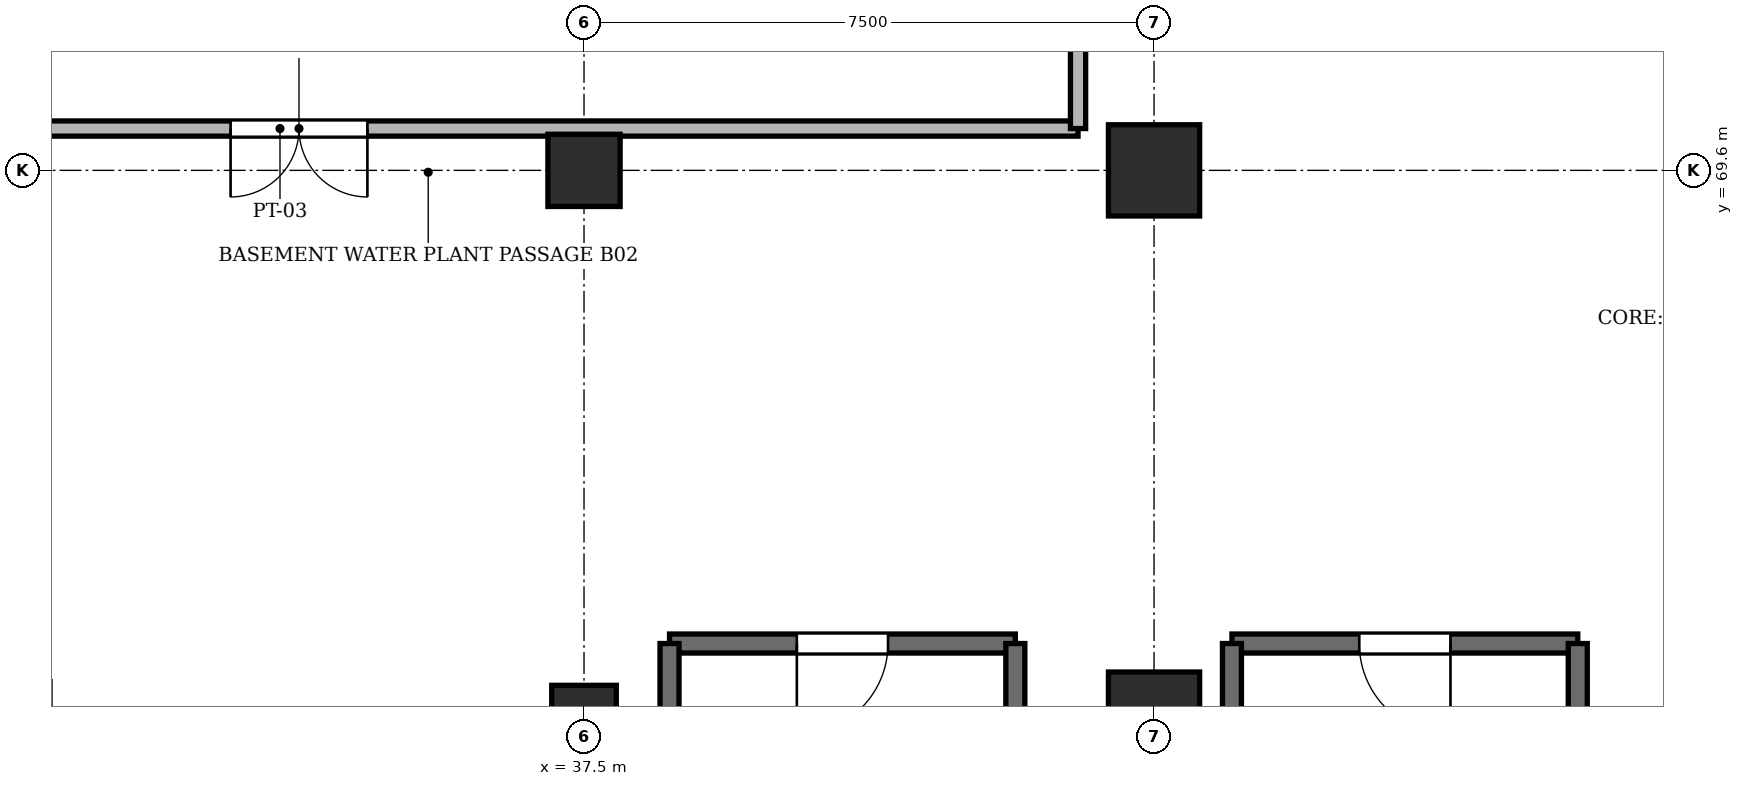
"""IFC4 building model, lengths in metres.
Left out: names, types, materials, properties, quantities, classifications, styles, units other than length and angle.
Written with IfcOpenShell. Run it as: python <this file> out.ifc"""

import sys

from ifc_helpers import new_model, si_unit, direction, frame, frame_2d, origin, origin_2d, place, context, subcontext, project, spatial, rectangle, extrude, element, fill, save


model = new_model("IFC4")
c1 = context("Model", 3, precision=1e-05, world=origin(), true_north=direction((0.0, 1.0)))
c2 = subcontext(c1, "Body", "Model", "MODEL_VIEW")
j1 = project(units=[si_unit("LENGTHUNIT", "METRE"), si_unit("PLANEANGLEUNIT", "RADIAN")], contexts=[c1])
p1 = place(None, origin())
s1 = spatial("IfcSite", under=j1, at=p1, CompositionType="ELEMENT")
p2 = place(p1, origin())
s2 = spatial("IfcBuilding", under=s1, at=p2, CompositionType="ELEMENT")
p3 = place(p2, frame((0.0, 0.0, -9.0)))
s3 = spatial("IfcBuildingStorey", under=s2, at=p3, CompositionType="ELEMENT", Elevation=-9.0)
p4 = place(p3, frame((37.5, 62.4, 0.0), z_axis=(0.0, 0.0, 1.0), x_axis=(1.0, 0.0, 0.0)))
e1 = element("IfcColumn", 1, at=p4, inside=s3, PredefinedType="COLUMN", context=c2, shape_type="SweptSolid", body=[
    extrude(rectangle(XDim=0.85, YDim=0.85, at=origin_2d()), origin(), (0.0, 0.0, 1.0), 4.18),
])
p5 = place(p3, frame((37.5, 69.6, 0.0), z_axis=(0.0, 0.0, 1.0), x_axis=(1.0, 0.0, 0.0)))
e2 = element("IfcColumn", 2, at=p5, inside=s3, PredefinedType="COLUMN", context=c2, shape_type="SweptSolid", body=[
    extrude(rectangle(XDim=0.95, YDim=0.95, at=origin_2d()), origin(), (0.0, 0.0, 1.0), 4.18),
])
for number, where, z_axis, x_axis in (
    (3, (45.0, 62.4, 0.0), (0.0, 0.0, 1.0), (1.0, 0.0, 0.0)),
    (4, (45.0, 69.6, 0.0), (0.0, 0.0, 1.0), (1.0, 0.0, 0.0)),
):
    element("IfcColumn", number, at=place(p3, frame(where, z_axis=z_axis, x_axis=x_axis)), inside=s3, PredefinedType="COLUMN", context=c2, shape_type="SweptSolid", body=[
        extrude(rectangle(XDim=1.2, YDim=1.2, at=origin_2d()), origin(), (0.0, 0.0, 1.0), 4.18),
    ])
p6 = place(p3, frame((50.575, 63.375, 0.0), z_axis=(0.0, 0.0, 1.0), x_axis=(-1.0, 0.0, 0.0)))
e5 = element("IfcWall", 5, at=p6, inside=s3, PredefinedType="SHEAR", context=c2, shape_type="SweptSolid", body=[
    extrude(rectangle(XDim=4.55, YDim=0.25, at=frame_2d((2.275, 0.0))), origin(), (0.0, 0.0, 1.0), 4.18),
])
p7 = place(p6, frame((1.675, 0.0, 0.0)))
e6 = element("IfcOpeningElement", 6, at=p7, cuts=e5, PredefinedType="OPENING", context=c2, shape_type="SweptSolid", body=[
    extrude(rectangle(XDim=1.2, YDim=2.2, at=frame_2d((0.6, 1.1))), frame((0.0, 0.137, 0.0), z_axis=(0.0, -1.0, 0.0), x_axis=(1.0, 0.0, 0.0)), (0.0, 0.0, 1.0), 0.274),
])
for number, where, z_axis, x_axis in (
    (7, (46.025, 63.375, 0.0), (0.0, 0.0, 1.0), (0.0, -1.0, 0.0)),
    (8, (50.575, 56.175, 0.0), (0.0, 0.0, 1.0), (0.0, 1.0, 0.0)),
):
    element("IfcWall", number, at=place(p3, frame(where, z_axis=z_axis, x_axis=x_axis)), inside=s3, PredefinedType="SHEAR", context=c2, shape_type="SweptSolid", body=[
        extrude(rectangle(XDim=7.2, YDim=0.25, at=frame_2d((3.6, 0.0))), origin(), (0.0, 0.0, 1.0), 4.18),
    ])
p8 = place(p3, frame((43.175, 63.375, 0.0), z_axis=(0.0, 0.0, 1.0), x_axis=(-1.0, 0.0, 0.0)))
e9 = element("IfcWall", 9, at=p8, inside=s3, PredefinedType="SHEAR", context=c2, shape_type="SweptSolid", body=[
    extrude(rectangle(XDim=4.55, YDim=0.25, at=frame_2d((2.275, 0.0))), origin(), (0.0, 0.0, 1.0), 4.18),
])
p9 = place(p8, frame((1.675, 0.0, 0.0)))
e10 = element("IfcOpeningElement", 10, at=p9, cuts=e9, PredefinedType="OPENING", context=c2, shape_type="SweptSolid", body=[
    extrude(rectangle(XDim=1.2, YDim=2.2, at=frame_2d((0.6, 1.1))), frame((0.0, 0.137, 0.0), z_axis=(0.0, -1.0, 0.0), x_axis=(1.0, 0.0, 0.0)), (0.0, 0.0, 1.0), 0.274),
])
for number, where, z_axis, x_axis in (
    (11, (38.625, 63.375, 0.0), (0.0, 0.0, 1.0), (0.0, -1.0, 0.0)),
    (12, (43.175, 56.175, 0.0), (0.0, 0.0, 1.0), (0.0, 1.0, 0.0)),
):
    element("IfcWall", number, at=place(p3, frame(where, z_axis=z_axis, x_axis=x_axis)), inside=s3, PredefinedType="SHEAR", context=c2, shape_type="SweptSolid", body=[
        extrude(rectangle(XDim=7.2, YDim=0.25, at=frame_2d((3.6, 0.0))), origin(), (0.0, 0.0, 1.0), 4.18),
    ])
p10 = place(p3, frame((23.0, 70.15, 0.0), z_axis=(0.0, 0.0, 1.0), x_axis=(1.0, 0.0, 0.0)))
e13 = element("IfcWall", 13, at=p10, inside=s3, PredefinedType="PARTITIONING", context=c2, shape_type="SweptSolid", body=[
    extrude(rectangle(XDim=21.0, YDim=0.2, at=frame_2d((10.5, 0.0))), origin(), (0.0, 0.0, 1.0), 3.78),
])
p11 = place(p10, frame((9.85, 0.0, 0.0)))
e14 = element("IfcOpeningElement", 14, at=p11, cuts=e13, PredefinedType="OPENING", context=c2, shape_type="SweptSolid", body=[
    extrude(rectangle(XDim=1.8, YDim=2.25, at=frame_2d((0.9, 1.125))), frame((0.0, 0.112, 0.0), z_axis=(0.0, -1.0, 0.0), x_axis=(1.0, 0.0, 0.0)), (0.0, 0.0, 1.0), 0.224),
])
p12 = place(p3, frame((44.0, 70.15, 0.0), z_axis=(0.0, 0.0, 1.0), x_axis=(0.0, 1.0, 0.0)))
e15 = element("IfcWall", 15, at=p12, inside=s3, PredefinedType="PARTITIONING", context=c2, shape_type="SweptSolid", body=[
    extrude(rectangle(XDim=6.75, YDim=0.2, at=frame_2d((3.375, 0.0))), origin(), (0.0, 0.0, 1.0), 3.78),
])
p13 = place(p7, origin())
e16 = element("IfcDoor", 16, at=p13, inside=s3, OperationType="SINGLE_SWING_LEFT", PredefinedType="DOOR", context=c2, shape_type="SweptSolid", body=[
    extrude(rectangle(XDim=1.2, YDim=2.2, at=frame_2d((0.6, 1.1))), frame((0.0, 0.025, 0.0), z_axis=(0.0, -1.0, 0.0), x_axis=(1.0, 0.0, 0.0)), (0.0, 0.0, 1.0), 0.05),
])
fill(e6, e16)
p14 = place(p9, origin())
e17 = element("IfcDoor", 17, at=p14, inside=s3, OperationType="SINGLE_SWING_RIGHT", PredefinedType="DOOR", context=c2, shape_type="SweptSolid", body=[
    extrude(rectangle(XDim=1.2, YDim=2.2, at=frame_2d((0.6, 1.1))), frame((0.0, 0.025, 0.0), z_axis=(0.0, -1.0, 0.0), x_axis=(1.0, 0.0, 0.0)), (0.0, 0.0, 1.0), 0.05),
])
fill(e10, e17)
p15 = place(p11, frame((1.8, 0.0, 0.0), z_axis=(0.0, 0.0, 1.0), x_axis=(-1.0, 0.0, 0.0)))
e18 = element("IfcDoor", 18, at=p15, inside=s3, OperationType="DOUBLE_DOOR_SINGLE_SWING", PredefinedType="DOOR", context=c2, shape_type="SweptSolid", body=[
    extrude(rectangle(XDim=1.8, YDim=2.25, at=frame_2d((0.9, 1.125))), frame((0.0, 0.025, 0.0), z_axis=(0.0, -1.0, 0.0), x_axis=(1.0, 0.0, 0.0)), (0.0, 0.0, 1.0), 0.05),
])
fill(e14, e18)
save(model, sys.argv[1])
